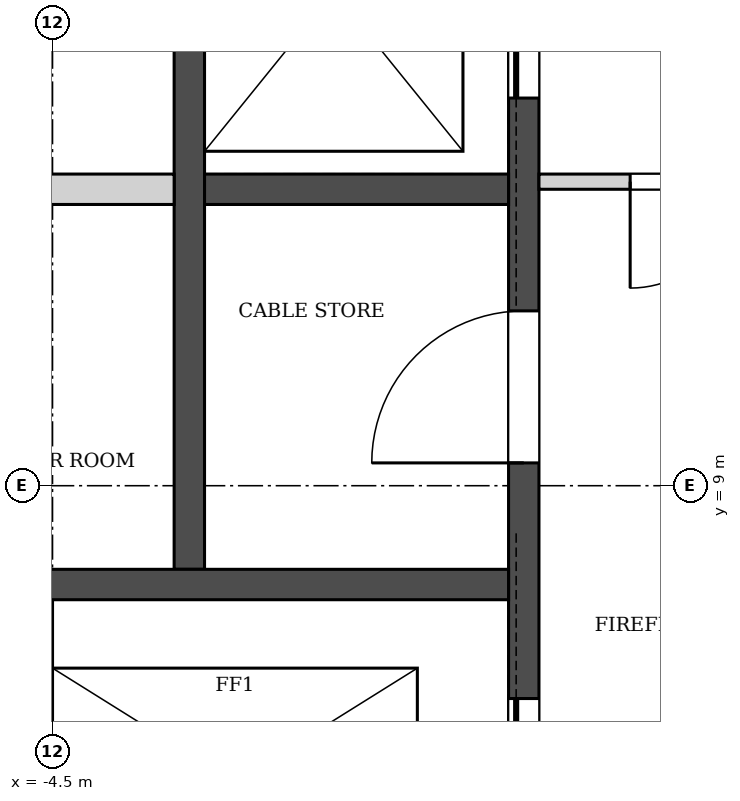
"""IFC4 building model, lengths in metres.
Left out: names, types, materials, properties, quantities, classifications, styles, units other than length and angle.
Written with IfcOpenShell. Run it as: python <this file> out.ifc"""

import sys

from ifc_helpers import new_model, si_unit, direction, frame, frame_2d, origin, place, context, subcontext, project, spatial, rectangle, extrude, element, fill, save


model = new_model("IFC4")
c1 = context("Model", 3, precision=1e-05, world=origin(), true_north=direction((0.0, 1.0)))
c2 = subcontext(c1, "Body", "Model", "MODEL_VIEW")
j1 = project(units=[si_unit("LENGTHUNIT", "METRE"), si_unit("PLANEANGLEUNIT", "RADIAN")], contexts=[c1])
p1 = place(None, origin())
s1 = spatial("IfcSite", under=j1, at=p1, CompositionType="ELEMENT")
p2 = place(p1, origin())
s2 = spatial("IfcBuilding", under=s1, at=p2, CompositionType="ELEMENT")
p3 = place(p2, frame((0.0, 0.0, 137.5)))
s3 = spatial("IfcBuildingStorey", under=s2, at=p3, CompositionType="ELEMENT", Elevation=137.5)
p4 = place(p3, frame((-3.6, 8.45, -0.4), z_axis=(0.0, 0.0, 1.0), x_axis=(0.0, 1.0, 0.0)))
e1 = element("IfcWall", 1, at=p4, inside=s3, PredefinedType="SOLIDWALL", context=c2, shape_type="SweptSolid", body=[
    extrude(rectangle(XDim=7.8, YDim=0.2, at=frame_2d((3.9, 0.0))), origin(), (0.0, 0.0, 1.0), 5.4),
])
p5 = place(p3, frame((-1.4, 5.85, -0.4), z_axis=(0.0, 0.0, 1.0), x_axis=(0.0, 1.0, 0.0)))
e2 = element("IfcWall", 2, at=p5, inside=s3, PredefinedType="SOLIDWALL", context=c2, shape_type="SweptSolid", body=[
    extrude(rectangle(XDim=11.75, YDim=0.2, at=frame_2d((5.875, 0.0))), origin(), (0.0, 0.0, 1.0), 5.4),
])
p6 = place(p5, frame((5.7, 0.0, 0.4)))
e3 = element("IfcOpeningElement", 3, at=p6, cuts=e2, PredefinedType="OPENING", context=c2, shape_type="SweptSolid", body=[
    extrude(rectangle(XDim=1.4, YDim=2.1, at=frame_2d((0.7, 1.05))), frame((0.0, 0.11, 0.0), z_axis=(0.0, -1.0, 0.0), x_axis=(1.0, 0.0, 0.0)), (0.0, 0.0, 1.0), 0.22),
])
p7 = place(p5, frame((8.3, 0.0, 0.4)))
e4 = element("IfcOpeningElement", 4, at=p7, cuts=e2, PredefinedType="OPENING", context=c2, shape_type="SweptSolid", body=[
    extrude(rectangle(XDim=1.4, YDim=2.1, at=frame_2d((0.7, 1.05))), frame((0.0, 0.11, 0.0), z_axis=(0.0, -1.0, 0.0), x_axis=(1.0, 0.0, 0.0)), (0.0, 0.0, 1.0), 0.22),
])
p8 = place(p5, frame((0.65, 0.0, 0.4)))
e5 = element("IfcOpeningElement", 5, at=p8, cuts=e2, PredefinedType="OPENING", context=c2, shape_type="SweptSolid", body=[
    extrude(rectangle(XDim=1.1, YDim=2.1, at=frame_2d((0.55, 1.05))), frame((0.0, 0.11, 0.0), z_axis=(0.0, -1.0, 0.0), x_axis=(1.0, 0.0, 0.0)), (0.0, 0.0, 1.0), 0.22),
])
p9 = place(p5, frame((3.3, 0.0, 0.4)))
e6 = element("IfcOpeningElement", 6, at=p9, cuts=e2, PredefinedType="OPENING", context=c2, shape_type="SweptSolid", body=[
    extrude(rectangle(XDim=1.0, YDim=2.1, at=frame_2d((0.5, 1.05))), frame((0.0, 0.11, 0.0), z_axis=(0.0, -1.0, 0.0), x_axis=(1.0, 0.0, 0.0)), (0.0, 0.0, 1.0), 0.22),
])
p10 = place(p3, frame((-5.7, 8.35, -0.4), z_axis=(0.0, 0.0, 1.0), x_axis=(1.0, 0.0, 0.0)))
e7 = element("IfcWall", 7, at=p10, inside=s3, PredefinedType="SOLIDWALL", context=c2, shape_type="SweptSolid", body=[
    extrude(rectangle(XDim=4.2, YDim=0.2, at=frame_2d((2.1, 0.0))), origin(), (0.0, 0.0, 1.0), 5.4),
])
p11 = place(p3, frame((-5.7, 10.95, 0.0), z_axis=(0.0, 0.0, 1.0), x_axis=(1.0, 0.0, 0.0)))
e8 = element("IfcWall", 8, at=p11, inside=s3, PredefinedType="SOLIDWALL", context=c2, shape_type="SweptSolid", body=[
    extrude(rectangle(XDim=2.0, YDim=0.2, at=frame_2d((1.0, 0.0))), origin(), (0.0, 0.0, 1.0), 5.0),
])
p12 = place(p3, frame((-3.5, 10.95, -0.4), z_axis=(0.0, 0.0, 1.0), x_axis=(1.0, 0.0, 0.0)))
e9 = element("IfcWall", 9, at=p12, inside=s3, PredefinedType="SOLIDWALL", context=c2, shape_type="SweptSolid", body=[
    extrude(rectangle(XDim=2.0, YDim=0.2, at=frame_2d((1.0, 0.0))), origin(), (0.0, 0.0, 1.0), 5.4),
])
p13 = place(p3, frame((-1.3, 11.0, 0.0), z_axis=(0.0, 0.0, 1.0), x_axis=(1.0, 0.0, 0.0)))
e10 = element("IfcWall", 10, at=p13, inside=s3, PredefinedType="PARTITIONING", context=c2, shape_type="SweptSolid", body=[
    extrude(rectangle(XDim=2.6, YDim=0.1, at=frame_2d((1.3, 0.0))), origin(), (0.0, 0.0, 1.0), 5.0),
])
p14 = place(p13, frame((0.6, 0.0, 0.0)))
e11 = element("IfcOpeningElement", 11, at=p14, cuts=e10, PredefinedType="OPENING", context=c2, shape_type="SweptSolid", body=[
    extrude(rectangle(XDim=1.4, YDim=2.1, at=frame_2d((0.7, 1.05))), frame((0.0, 0.06, 0.0), z_axis=(0.0, -1.0, 0.0), x_axis=(1.0, 0.0, 0.0)), (0.0, 0.0, 1.0), 0.12),
])
p15 = place(p6, origin())
e12 = element("IfcDoor", 12, at=p15, inside=s3, OperationType="SLIDING_TO_LEFT", PredefinedType="DOOR", context=c2, shape_type="SweptSolid", body=[
    extrude(rectangle(XDim=1.4, YDim=2.1, at=frame_2d((0.7, 1.05))), frame((0.0, 0.025, 0.0), z_axis=(0.0, -1.0, 0.0), x_axis=(1.0, 0.0, 0.0)), (0.0, 0.0, 1.0), 0.05),
])
fill(e3, e12)
p16 = place(p8, origin())
e13 = element("IfcDoor", 13, at=p16, inside=s3, OperationType="SLIDING_TO_RIGHT", PredefinedType="DOOR", context=c2, shape_type="SweptSolid", body=[
    extrude(rectangle(XDim=1.1, YDim=2.1, at=frame_2d((0.55, 1.05))), frame((0.0, 0.025, 0.0), z_axis=(0.0, -1.0, 0.0), x_axis=(1.0, 0.0, 0.0)), (0.0, 0.0, 1.0), 0.05),
])
fill(e5, e13)
p17 = place(p9, origin())
e14 = element("IfcDoor", 14, at=p17, inside=s3, OperationType="SINGLE_SWING_LEFT", PredefinedType="DOOR", context=c2, shape_type="SweptSolid", body=[
    extrude(rectangle(XDim=1.0, YDim=2.1, at=frame_2d((0.5, 1.05))), frame((0.0, 0.025, 0.0), z_axis=(0.0, -1.0, 0.0), x_axis=(1.0, 0.0, 0.0)), (0.0, 0.0, 1.0), 0.05),
])
fill(e6, e14)
p18 = place(p14, frame((1.4, 0.0, 0.0), z_axis=(0.0, 0.0, 1.0), x_axis=(-1.0, 0.0, 0.0)))
e15 = element("IfcDoor", 15, at=p18, inside=s3, OperationType="DOUBLE_DOOR_SINGLE_SWING", PredefinedType="DOOR", context=c2, shape_type="SweptSolid", body=[
    extrude(rectangle(XDim=1.4, YDim=2.1, at=frame_2d((0.7, 1.05))), frame((0.0, 0.025, 0.0), z_axis=(0.0, -1.0, 0.0), x_axis=(1.0, 0.0, 0.0)), (0.0, 0.0, 1.0), 0.05),
])
fill(e11, e15)
save(model, sys.argv[1])
